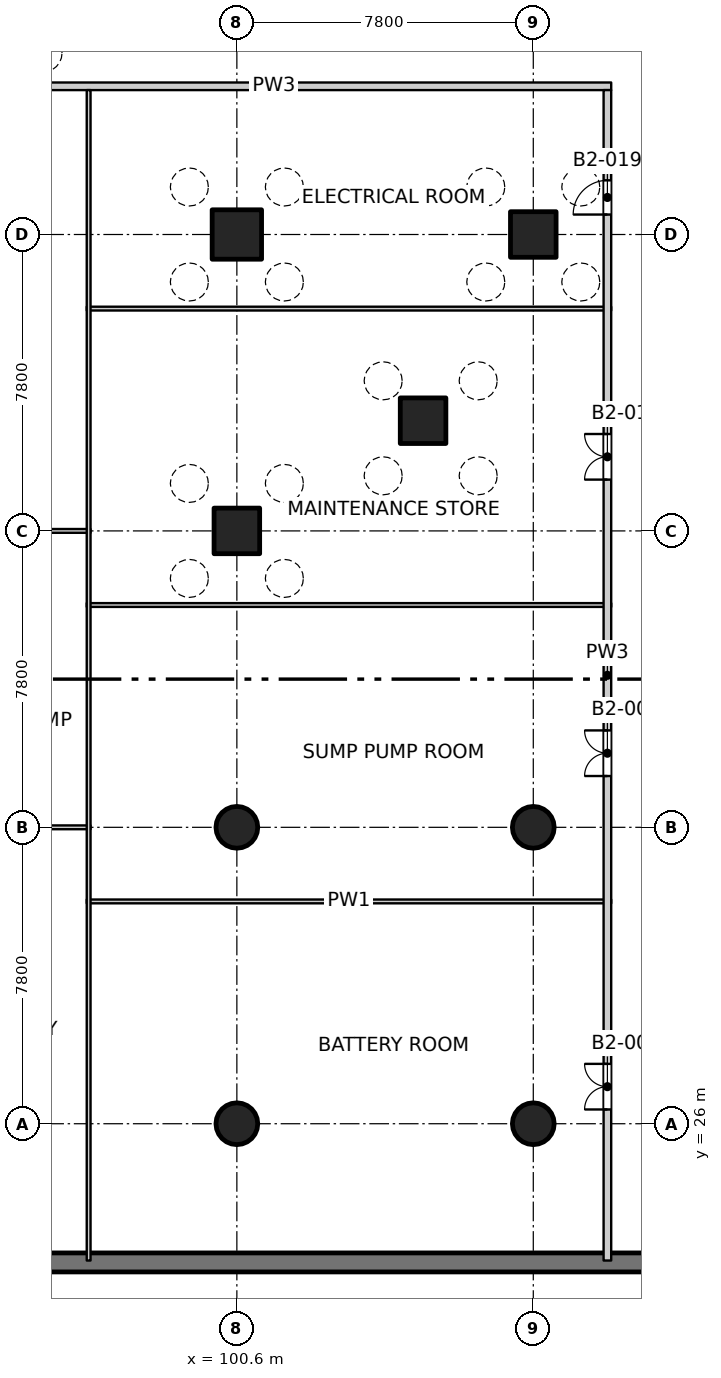
"""IFC4 building model, lengths in metres.
Left out: names, types, materials, properties, quantities, classifications, styles, units other than length and angle.
Written with IfcOpenShell. Run it as: python <this file> out.ifc"""

import sys

from ifc_helpers import new_model, si_unit, direction, frame, frame_2d, origin, origin_2d, place, context, subcontext, project, spatial, rectangle, circle, extrude, element, fill, save


model = new_model("IFC4")
c1 = context("Model", 3, precision=1e-05, world=origin(), true_north=direction((0.0, 1.0)))
c2 = subcontext(c1, "Body", "Model", "MODEL_VIEW")
j1 = project(units=[si_unit("LENGTHUNIT", "METRE"), si_unit("PLANEANGLEUNIT", "RADIAN")], contexts=[c1])
p1 = place(None, origin())
s1 = spatial("IfcSite", under=j1, at=p1, CompositionType="ELEMENT")
p2 = place(p1, origin())
s2 = spatial("IfcBuilding", under=s1, at=p2, CompositionType="ELEMENT")
p3 = place(p2, frame((0.0, 0.0, -9.0)))
s3 = spatial("IfcBuildingStorey", under=s2, at=p3, CompositionType="ELEMENT", Elevation=-9.0)
p4 = place(p3, frame((42.6, 22.35, -0.5), z_axis=(0.0, 0.0, 1.0), x_axis=(1.0, 0.0, 0.0)))
e1 = element("IfcWall", 1, at=p4, inside=s3, PredefinedType="SOLIDWALL", context=c2, shape_type="SweptSolid", body=[
    extrude(rectangle(XDim=84.8, YDim=0.5, at=frame_2d((42.4, 0.0))), origin(), (0.0, 0.0, 1.0), 4.65),
])
for number, where, z_axis, x_axis in (
    (2, (105.5, 44.5, -0.5), (0.0, 0.0, 1.0), (1.0, 0.0, 0.0)),
    (3, (108.4, 49.4, -0.5), (0.0, 0.0, 1.0), (1.0, 0.0, 0.0)),
    (4, (100.6, 41.6, -0.5), (0.0, 0.0, 1.0), (1.0, 0.0, 0.0)),
):
    element("IfcColumn", number, at=place(p3, frame(where, z_axis=z_axis, x_axis=x_axis)), inside=s3, PredefinedType="COLUMN", context=c2, shape_type="SweptSolid", body=[
        extrude(rectangle(XDim=1.2, YDim=1.2, at=origin_2d()), origin(), (0.0, 0.0, 1.0), 4.65),
    ])
p5 = place(p3, frame((100.6, 49.4, -0.5), z_axis=(0.0, 0.0, 1.0), x_axis=(1.0, 0.0, 0.0)))
e5 = element("IfcColumn", 5, at=p5, inside=s3, PredefinedType="COLUMN", context=c2, shape_type="SweptSolid", body=[
    extrude(rectangle(XDim=1.3, YDim=1.3, at=origin_2d()), origin(), (0.0, 0.0, 1.0), 4.65),
])
for number, where, z_axis, x_axis in (
    (6, (100.6, 26.0, -0.5), (0.0, 0.0, 1.0), (1.0, 0.0, 0.0)),
    (7, (100.6, 33.8, -0.5), (0.0, 0.0, 1.0), (1.0, 0.0, 0.0)),
    (8, (108.4, 26.0, -0.5), (0.0, 0.0, 1.0), (1.0, 0.0, 0.0)),
    (9, (108.4, 33.8, -0.5), (0.0, 0.0, 1.0), (1.0, 0.0, 0.0)),
):
    element("IfcColumn", number, at=place(p3, frame(where, z_axis=z_axis, x_axis=x_axis)), inside=s3, PredefinedType="COLUMN", context=c2, shape_type="SweptSolid", body=[
        extrude(circle(Radius=0.55, at=origin_2d()), origin(), (0.0, 0.0, 1.0), 4.65),
    ])
p6 = place(p3, frame((96.65, 31.85, 0.0), z_axis=(0.0, 0.0, 1.0), x_axis=(1.0, 0.0, 0.0)))
e10 = element("IfcWall", 10, at=p6, inside=s3, PredefinedType="PARTITIONING", context=c2, shape_type="SweptSolid", body=[
    extrude(rectangle(XDim=13.8, YDim=0.1, at=frame_2d((6.9, 0.0))), origin(), (0.0, 0.0, 1.0), 4.15),
])
p7 = place(p3, frame((92.75, 33.8, 0.0), z_axis=(0.0, 0.0, 1.0), x_axis=(1.0, 0.0, 0.0)))
e11 = element("IfcWall", 11, at=p7, inside=s3, PredefinedType="PARTITIONING", context=c2, shape_type="SweptSolid", body=[
    extrude(rectangle(XDim=4.0, YDim=0.1, at=frame_2d((2.0, 0.0))), origin(), (0.0, 0.0, 1.0), 4.15),
])
p8 = place(p3, frame((96.65, 39.65, 0.0), z_axis=(0.0, 0.0, 1.0), x_axis=(1.0, 0.0, 0.0)))
e12 = element("IfcWall", 12, at=p8, inside=s3, PredefinedType="PARTITIONING", context=c2, shape_type="SweptSolid", body=[
    extrude(rectangle(XDim=13.8, YDim=0.1, at=frame_2d((6.9, 0.0))), origin(), (0.0, 0.0, 1.0), 4.15),
])
p9 = place(p3, frame((92.75, 41.6, 0.0), z_axis=(0.0, 0.0, 1.0), x_axis=(1.0, 0.0, 0.0)))
e13 = element("IfcWall", 13, at=p9, inside=s3, PredefinedType="PARTITIONING", context=c2, shape_type="SweptSolid", body=[
    extrude(rectangle(XDim=4.0, YDim=0.1, at=frame_2d((2.0, 0.0))), origin(), (0.0, 0.0, 1.0), 4.15),
])
p10 = place(p3, frame((96.65, 47.45, 0.0), z_axis=(0.0, 0.0, 1.0), x_axis=(1.0, 0.0, 0.0)))
e14 = element("IfcWall", 14, at=p10, inside=s3, PredefinedType="PARTITIONING", context=c2, shape_type="SweptSolid", body=[
    extrude(rectangle(XDim=13.8, YDim=0.1, at=frame_2d((6.9, 0.0))), origin(), (0.0, 0.0, 1.0), 4.15),
])
p11 = place(p3, frame((92.7, 53.3, 0.0), z_axis=(0.0, 0.0, 1.0), x_axis=(1.0, 0.0, 0.0)))
e15 = element("IfcWall", 15, at=p11, inside=s3, PredefinedType="PARTITIONING", context=c2, shape_type="SweptSolid", body=[
    extrude(rectangle(XDim=17.75, YDim=0.2, at=frame_2d((8.875, 0.0))), origin(), (0.0, 0.0, 1.0), 4.15),
])
p12 = place(p3, frame((96.7, 22.4, 0.0), z_axis=(0.0, 0.0, 1.0), x_axis=(0.0, 1.0, 0.0)))
e16 = element("IfcWall", 16, at=p12, inside=s3, PredefinedType="PARTITIONING", context=c2, shape_type="SweptSolid", body=[
    extrude(rectangle(XDim=30.8, YDim=0.1, at=frame_2d((15.4, 0.0))), origin(), (0.0, 0.0, 1.0), 4.15),
])
p13 = place(p3, frame((110.35, 22.4, 0.0), z_axis=(0.0, 0.0, 1.0), x_axis=(0.0, 1.0, 0.0)))
e17 = element("IfcWall", 17, at=p13, inside=s3, PredefinedType="PARTITIONING", context=c2, shape_type="SweptSolid", body=[
    extrude(rectangle(XDim=30.8, YDim=0.2, at=frame_2d((15.4, 0.0))), origin(), (0.0, 0.0, 1.0), 4.15),
])
p14 = place(p13, frame((3.975, 0.0, 0.0)))
e18 = element("IfcOpeningElement", 18, at=p14, cuts=e17, PredefinedType="OPENING", context=c2, shape_type="SweptSolid", body=[
    extrude(rectangle(XDim=1.2, YDim=2.1, at=frame_2d((0.6, 1.05))), frame((0.0, 0.11, 0.0), z_axis=(0.0, -1.0, 0.0), x_axis=(1.0, 0.0, 0.0)), (0.0, 0.0, 1.0), 0.22),
])
p15 = place(p13, frame((12.75, 0.0, 0.0)))
e19 = element("IfcOpeningElement", 19, at=p15, cuts=e17, PredefinedType="OPENING", context=c2, shape_type="SweptSolid", body=[
    extrude(rectangle(XDim=1.2, YDim=2.1, at=frame_2d((0.6, 1.05))), frame((0.0, 0.11, 0.0), z_axis=(0.0, -1.0, 0.0), x_axis=(1.0, 0.0, 0.0)), (0.0, 0.0, 1.0), 0.22),
])
p16 = place(p13, frame((20.55, 0.0, 0.0)))
e20 = element("IfcOpeningElement", 20, at=p16, cuts=e17, PredefinedType="OPENING", context=c2, shape_type="SweptSolid", body=[
    extrude(rectangle(XDim=1.2, YDim=2.1, at=frame_2d((0.6, 1.05))), frame((0.0, 0.11, 0.0), z_axis=(0.0, -1.0, 0.0), x_axis=(1.0, 0.0, 0.0)), (0.0, 0.0, 1.0), 0.22),
])
p17 = place(p13, frame((27.525, 0.0, 0.0)))
e21 = element("IfcOpeningElement", 21, at=p17, cuts=e17, PredefinedType="OPENING", context=c2, shape_type="SweptSolid", body=[
    extrude(rectangle(XDim=0.9, YDim=2.1, at=frame_2d((0.45, 1.05))), frame((0.0, 0.11, 0.0), z_axis=(0.0, -1.0, 0.0), x_axis=(1.0, 0.0, 0.0)), (0.0, 0.0, 1.0), 0.22),
])
p18 = place(p14, origin())
e22 = element("IfcDoor", 22, at=p18, inside=s3, OperationType="DOUBLE_DOOR_SINGLE_SWING", PredefinedType="DOOR", context=c2, shape_type="SweptSolid", body=[
    extrude(rectangle(XDim=1.2, YDim=2.1, at=frame_2d((0.6, 1.05))), frame((0.0, 0.025, 0.0), z_axis=(0.0, -1.0, 0.0), x_axis=(1.0, 0.0, 0.0)), (0.0, 0.0, 1.0), 0.05),
])
fill(e18, e22)
p19 = place(p15, origin())
e23 = element("IfcDoor", 23, at=p19, inside=s3, OperationType="DOUBLE_DOOR_SINGLE_SWING", PredefinedType="DOOR", context=c2, shape_type="SweptSolid", body=[
    extrude(rectangle(XDim=1.2, YDim=2.1, at=frame_2d((0.6, 1.05))), frame((0.0, 0.025, 0.0), z_axis=(0.0, -1.0, 0.0), x_axis=(1.0, 0.0, 0.0)), (0.0, 0.0, 1.0), 0.05),
])
fill(e19, e23)
p20 = place(p16, origin())
e24 = element("IfcDoor", 24, at=p20, inside=s3, OperationType="DOUBLE_DOOR_SINGLE_SWING", PredefinedType="DOOR", context=c2, shape_type="SweptSolid", body=[
    extrude(rectangle(XDim=1.2, YDim=2.1, at=frame_2d((0.6, 1.05))), frame((0.0, 0.025, 0.0), z_axis=(0.0, -1.0, 0.0), x_axis=(1.0, 0.0, 0.0)), (0.0, 0.0, 1.0), 0.05),
])
fill(e20, e24)
p21 = place(p17, origin())
e25 = element("IfcDoor", 25, at=p21, inside=s3, OperationType="SINGLE_SWING_LEFT", PredefinedType="DOOR", context=c2, shape_type="SweptSolid", body=[
    extrude(rectangle(XDim=0.9, YDim=2.1, at=frame_2d((0.45, 1.05))), frame((0.0, 0.025, 0.0), z_axis=(0.0, -1.0, 0.0), x_axis=(1.0, 0.0, 0.0)), (0.0, 0.0, 1.0), 0.05),
])
fill(e21, e25)
save(model, sys.argv[1])
